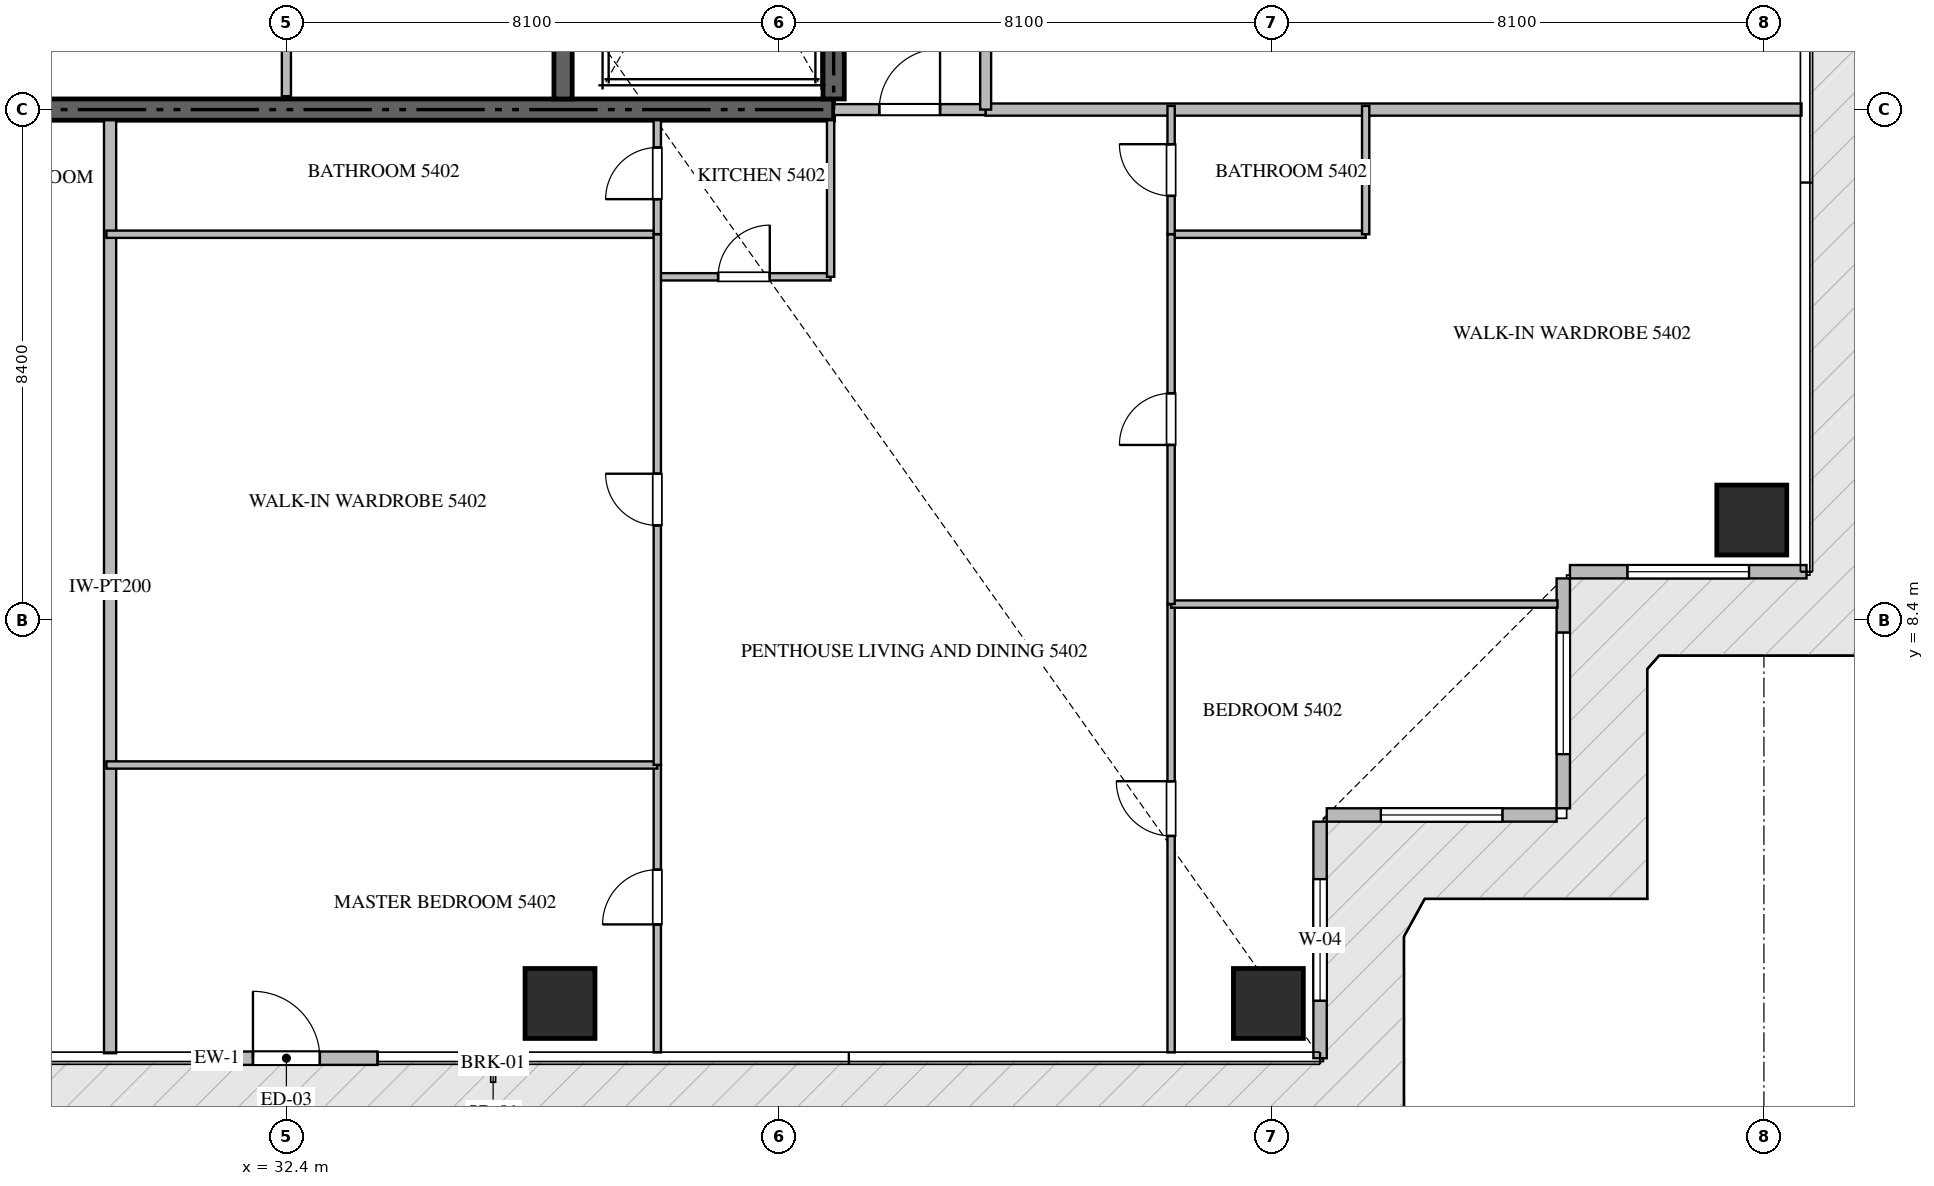
"""IFC4 building model, lengths in metres.
Left out: names, types, materials, properties, quantities, classifications, styles, units other than length and angle.
Written with IfcOpenShell. Run it as: python <this file> out.ifc"""

import sys

from ifc_helpers import new_model, si_unit, direction, frame, frame_2d, origin, origin_2d, place, context, subcontext, project, spatial, rectangle, extrude, source, transform, mapped, element, fill, save


model = new_model("IFC4")
c1 = context("Model", 3, precision=1e-05, world=origin(), true_north=direction((0.0, 1.0)))
c2 = subcontext(c1, "Body", "Model", "MODEL_VIEW")
j1 = project(units=[si_unit("LENGTHUNIT", "METRE"), si_unit("PLANEANGLEUNIT", "RADIAN")], contexts=[c1])
p1 = place(None, origin())
s1 = spatial("IfcSite", under=j1, at=p1, CompositionType="ELEMENT")
p2 = place(p1, origin())
s2 = spatial("IfcBuilding", under=s1, at=p2, CompositionType="ELEMENT")
p3 = place(p2, frame((0.0, 0.0, 218.15)))
s3 = spatial("IfcBuildingStorey", under=s2, at=p3, CompositionType="ELEMENT", Elevation=218.15)
p4 = place(p3, frame((23.4, 16.8, -0.26), z_axis=(0.0, 0.0, 1.0), x_axis=(1.0, 0.0, 0.0)))
e1 = element("IfcWall", 1, at=p4, inside=s3, PredefinedType="SHEAR", context=c2, shape_type="SweptSolid", body=[
    extrude(rectangle(XDim=18.0, YDim=0.35, at=frame_2d((9.0, 0.0))), origin(), (0.0, 0.0, 1.0), 3.848),
])
p5 = place(p3, frame((41.4, 16.975, -0.26), z_axis=(0.0, 0.0, 1.0), x_axis=(0.0, 1.0, 0.0)))
e2 = element("IfcWall", 2, at=p5, inside=s3, PredefinedType="SHEAR", context=c2, shape_type="SweptSolid", body=[
    extrude(rectangle(XDim=8.375, YDim=0.35, at=frame_2d((4.188, 0.0))), origin(), (0.0, 0.0, 1.0), 3.848),
])
p6 = place(p3, frame((36.95, 16.975, -0.26), z_axis=(0.0, 0.0, 1.0), x_axis=(0.0, 1.0, 0.0)))
e3 = element("IfcWall", 3, at=p6, inside=s3, PredefinedType="SHEAR", context=c2, shape_type="SweptSolid", body=[
    extrude(rectangle(XDim=8.375, YDim=0.3, at=frame_2d((4.188, 0.0))), origin(), (0.0, 0.0, 1.0), 3.848),
])
m1 = source(origin(), c2, "Body", "SweptSolid", [
    extrude(rectangle(XDim=1.15, YDim=1.15, at=origin_2d()), origin(), (0.0, 0.0, 1.0), 3.85),
])
for number, where, z_axis, x_axis in (
    (4, (36.9, 2.1, -0.26), (0.0, 0.0, 1.0), (1.0, 0.0, 0.0)),
    (5, (48.55, 2.1, -0.26), (0.0, 0.0, 1.0), (1.0, 0.0, 0.0)),
    (6, (56.5, 10.05, -0.26), (0.0, 0.0, 1.0), (1.0, 0.0, 0.0)),
):
    element("IfcColumn", number, at=place(p3, frame(where, z_axis=z_axis, x_axis=x_axis)), inside=s3, PredefinedType="COLUMN", context=c2, shape_type="MappedRepresentation", body=[
        mapped(m1, transform((0.0, 0.0, 0.0), scale=1.0)),
    ])
p7 = place(p3, frame((30.9, 1.2, 0.0), z_axis=(0.0, 0.0, 1.0), x_axis=(1.0, 0.0, 0.0)))
e7 = element("IfcWall", 7, at=p7, inside=s3, PredefinedType="ELEMENTEDWALL", context=c2, shape_type="SweptSolid", body=[
    extrude(rectangle(XDim=3.0, YDim=0.22, at=frame_2d((1.5, 0.0))), origin(), (0.0, 0.0, 1.0), 3.575),
])
p8 = place(p7, frame((0.95, 0.0, 0.0)))
e8 = element("IfcOpeningElement", 8, at=p8, cuts=e7, PredefinedType="OPENING", context=c2, shape_type="SweptSolid", body=[
    extrude(rectangle(XDim=1.1, YDim=2.2, at=frame_2d((0.55, 1.1))), frame((0.0, 0.12, 0.0), z_axis=(0.0, -1.0, 0.0), x_axis=(1.0, 0.0, 0.0)), (0.0, 0.0, 1.0), 0.24),
])
p9 = place(p3, frame((49.4, 1.2, 0.0), z_axis=(0.0, 0.0, 1.0), x_axis=(0.0, 1.0, 0.0)))
e9 = element("IfcWall", 9, at=p9, inside=s3, PredefinedType="ELEMENTEDWALL", context=c2, shape_type="SweptSolid", body=[
    extrude(rectangle(XDim=3.89, YDim=0.22, at=frame_2d((1.945, 0.0))), origin(), (0.0, 0.0, 1.0), 3.575),
])
p10 = place(p9, frame((0.945, 0.0, 0.65)))
e10 = element("IfcOpeningElement", 10, at=p10, cuts=e9, PredefinedType="OPENING", context=c2, shape_type="SweptSolid", body=[
    extrude(rectangle(XDim=2.0, YDim=2.2, at=frame_2d((1.0, 1.1))), frame((0.0, 0.12, 0.0), z_axis=(0.0, -1.0, 0.0), x_axis=(1.0, 0.0, 0.0)), (0.0, 0.0, 1.0), 0.24),
])
p11 = place(p3, frame((49.51, 5.2, 0.0), z_axis=(0.0, 0.0, 1.0), x_axis=(1.0, 0.0, 0.0)))
e11 = element("IfcWall", 11, at=p11, inside=s3, PredefinedType="ELEMENTEDWALL", context=c2, shape_type="SweptSolid", body=[
    extrude(rectangle(XDim=3.78, YDim=0.22, at=frame_2d((1.89, 0.0))), origin(), (0.0, 0.0, 1.0), 3.575),
])
p12 = place(p11, frame((0.89, 0.0, 0.65)))
e12 = element("IfcOpeningElement", 12, at=p12, cuts=e11, PredefinedType="OPENING", context=c2, shape_type="SweptSolid", body=[
    extrude(rectangle(XDim=2.0, YDim=2.2, at=frame_2d((1.0, 1.1))), frame((0.0, 0.12, 0.0), z_axis=(0.0, -1.0, 0.0), x_axis=(1.0, 0.0, 0.0)), (0.0, 0.0, 1.0), 0.24),
])
p13 = place(p3, frame((53.4, 5.31, 0.0), z_axis=(0.0, 0.0, 1.0), x_axis=(0.0, 1.0, 0.0)))
e13 = element("IfcWall", 13, at=p13, inside=s3, PredefinedType="ELEMENTEDWALL", context=c2, shape_type="SweptSolid", body=[
    extrude(rectangle(XDim=3.78, YDim=0.22, at=frame_2d((1.89, 0.0))), origin(), (0.0, 0.0, 1.0), 3.575),
])
p14 = place(p13, frame((0.89, 0.0, 0.65)))
e14 = element("IfcOpeningElement", 14, at=p14, cuts=e13, PredefinedType="OPENING", context=c2, shape_type="SweptSolid", body=[
    extrude(rectangle(XDim=2.0, YDim=2.2, at=frame_2d((1.0, 1.1))), frame((0.0, 0.12, 0.0), z_axis=(0.0, -1.0, 0.0), x_axis=(1.0, 0.0, 0.0)), (0.0, 0.0, 1.0), 0.24),
])
p15 = place(p3, frame((53.51, 9.2, 0.0), z_axis=(0.0, 0.0, 1.0), x_axis=(1.0, 0.0, 0.0)))
e15 = element("IfcWall", 15, at=p15, inside=s3, PredefinedType="ELEMENTEDWALL", context=c2, shape_type="SweptSolid", body=[
    extrude(rectangle(XDim=3.89, YDim=0.22, at=frame_2d((1.945, 0.0))), origin(), (0.0, 0.0, 1.0), 3.575),
])
p16 = place(p15, frame((0.945, 0.0, 0.65)))
e16 = element("IfcOpeningElement", 16, at=p16, cuts=e15, PredefinedType="OPENING", context=c2, shape_type="SweptSolid", body=[
    extrude(rectangle(XDim=2.0, YDim=2.2, at=frame_2d((1.0, 1.1))), frame((0.0, 0.12, 0.0), z_axis=(0.0, -1.0, 0.0), x_axis=(1.0, 0.0, 0.0)), (0.0, 0.0, 1.0), 0.24),
])
p17 = place(p3, frame((32.4, 17.02, 0.0), z_axis=(0.0, 0.0, 1.0), x_axis=(0.0, 1.0, 0.0)))
e17 = element("IfcWall", 17, at=p17, inside=s3, PredefinedType="PARTITIONING", context=c2, shape_type="SweptSolid", body=[
    extrude(rectangle(XDim=2.73, YDim=0.15, at=frame_2d((1.365, 0.0))), origin(), (0.0, 0.0, 1.0), 3.59),
])
p18 = place(p3, frame((29.5, 1.282, 0.0), z_axis=(0.0, 0.0, 1.0), x_axis=(0.0, 1.0, 0.0)))
e18 = element("IfcWall", 18, at=p18, inside=s3, PredefinedType="PARTITIONING", context=c2, shape_type="SweptSolid", body=[
    extrude(rectangle(XDim=15.343, YDim=0.2, at=frame_2d((7.671, 0.0))), origin(), (0.0, 0.0, 1.0), 3.59),
])
p19 = place(p3, frame((43.9, 16.8, 0.0), z_axis=(0.0, 0.0, 1.0), x_axis=(1.0, 0.0, 0.0)))
e19 = element("IfcWall", 19, at=p19, inside=s3, PredefinedType="PARTITIONING", context=c2, shape_type="SweptSolid", body=[
    extrude(rectangle(XDim=13.418, YDim=0.2, at=frame_2d((6.709, 0.0))), origin(), (0.0, 0.0, 1.0), 3.59),
])
p20 = place(p3, frame((41.402, 16.8, 0.0), z_axis=(0.0, 0.0, 1.0), x_axis=(1.0, 0.0, 0.0)))
e20 = element("IfcWall", 20, at=p20, inside=s3, PredefinedType="PARTITIONING", context=c2, shape_type="SweptSolid", body=[
    extrude(rectangle(XDim=2.496, YDim=0.18, at=frame_2d((1.248, 0.0))), origin(), (0.0, 0.0, 1.0), 3.59),
])
p21 = place(p20, frame((0.748, 0.0, 0.0)))
e21 = element("IfcOpeningElement", 21, at=p21, cuts=e20, PredefinedType="OPENING", context=c2, shape_type="SweptSolid", body=[
    extrude(rectangle(XDim=1.0, YDim=2.15, at=frame_2d((0.5, 1.075))), frame((0.0, 0.1, 0.0), z_axis=(0.0, -1.0, 0.0), x_axis=(1.0, 0.0, 0.0)), (0.0, 0.0, 1.0), 0.2),
])
p22 = place(p3, frame((43.9, 16.8, 0.0), z_axis=(0.0, 0.0, 1.0), x_axis=(0.0, 1.0, 0.0)))
e22 = element("IfcWall", 22, at=p22, inside=s3, PredefinedType="PARTITIONING", context=c2, shape_type="SweptSolid", body=[
    extrude(rectangle(XDim=16.8, YDim=0.18, at=frame_2d((8.4, 0.0))), origin(), (0.0, 0.0, 1.0), 3.59),
])
p23 = place(p22, frame((1.3, 0.0, 0.0)))
e23 = element("IfcOpeningElement", 23, at=p23, cuts=e22, PredefinedType="OPENING", context=c2, shape_type="SweptSolid", body=[
    extrude(rectangle(XDim=1.0, YDim=2.15, at=frame_2d((0.5, 1.075))), frame((0.0, 0.1, 0.0), z_axis=(0.0, -1.0, 0.0), x_axis=(1.0, 0.0, 0.0)), (0.0, 0.0, 1.0), 0.2),
])
p24 = place(p3, frame((38.5, 14.05, 0.0), z_axis=(0.0, 0.0, 1.0), x_axis=(1.0, 0.0, 0.0)))
e24 = element("IfcWall", 24, at=p24, inside=s3, PredefinedType="PARTITIONING", context=c2, shape_type="SweptSolid", body=[
    extrude(rectangle(XDim=2.85, YDim=0.12, at=frame_2d((1.425, 0.0))), origin(), (0.0, 0.0, 1.0), 3.59),
])
p25 = place(p24, frame((1.0, 0.0, 0.0)))
e25 = element("IfcOpeningElement", 25, at=p25, cuts=e24, PredefinedType="OPENING", context=c2, shape_type="SweptSolid", body=[
    extrude(rectangle(XDim=0.85, YDim=2.1, at=frame_2d((0.425, 1.05))), frame((0.0, 0.07, 0.0), z_axis=(0.0, -1.0, 0.0), x_axis=(1.0, 0.0, 0.0)), (0.0, 0.0, 1.0), 0.14),
])
p26 = place(p3, frame((41.35, 14.05, 0.0), z_axis=(0.0, 0.0, 1.0), x_axis=(0.0, 1.0, 0.0)))
e26 = element("IfcWall", 26, at=p26, inside=s3, PredefinedType="PARTITIONING", context=c2, shape_type="SweptSolid", body=[
    extrude(rectangle(XDim=2.575, YDim=0.12, at=frame_2d((1.288, 0.0))), origin(), (0.0, 0.0, 1.0), 3.59),
])
p27 = place(p3, frame((38.5, 1.295, 0.0), z_axis=(0.0, 0.0, 1.0), x_axis=(0.0, 1.0, 0.0)))
e27 = element("IfcWall", 27, at=p27, inside=s3, PredefinedType="PARTITIONING", context=c2, shape_type="SweptSolid", body=[
    extrude(rectangle(XDim=4.727, YDim=0.12, at=frame_2d((2.364, 0.0))), origin(), (0.0, 0.0, 1.0), 3.59),
])
p28 = place(p27, frame((2.105, 0.0, 0.0)))
e28 = element("IfcOpeningElement", 28, at=p28, cuts=e27, PredefinedType="OPENING", context=c2, shape_type="SweptSolid", body=[
    extrude(rectangle(XDim=0.9, YDim=2.1, at=frame_2d((0.45, 1.05))), frame((0.0, 0.07, 0.0), z_axis=(0.0, -1.0, 0.0), x_axis=(1.0, 0.0, 0.0)), (0.0, 0.0, 1.0), 0.14),
])
for number, where, z_axis, x_axis in (
    (29, (29.44, 6.022, 0.0), (0.0, 0.0, 1.0), (1.0, 0.0, 0.0)),
    (30, (29.44, 14.75, 0.0), (0.0, 0.0, 1.0), (1.0, 0.0, 0.0)),
):
    element("IfcWall", number, at=place(p3, frame(where, z_axis=z_axis, x_axis=x_axis)), inside=s3, PredefinedType="PARTITIONING", context=c2, shape_type="SweptSolid", body=[
        extrude(rectangle(XDim=9.06, YDim=0.12, at=frame_2d((4.53, 0.0))), origin(), (0.0, 0.0, 1.0), 3.59),
    ])
p29 = place(p3, frame((38.5, 6.024, 0.0), z_axis=(0.0, 0.0, 1.0), x_axis=(0.0, 1.0, 0.0)))
e31 = element("IfcWall", 31, at=p29, inside=s3, PredefinedType="PARTITIONING", context=c2, shape_type="SweptSolid", body=[
    extrude(rectangle(XDim=8.726, YDim=0.12, at=frame_2d((4.363, 0.0))), origin(), (0.0, 0.0, 1.0), 3.59),
])
p30 = place(p29, frame((3.938, 0.0, 0.0)))
e32 = element("IfcOpeningElement", 32, at=p30, cuts=e31, PredefinedType="OPENING", context=c2, shape_type="SweptSolid", body=[
    extrude(rectangle(XDim=0.85, YDim=2.1, at=frame_2d((0.425, 1.05))), frame((0.0, 0.07, 0.0), z_axis=(0.0, -1.0, 0.0), x_axis=(1.0, 0.0, 0.0)), (0.0, 0.0, 1.0), 0.14),
])
p31 = place(p3, frame((38.5, 14.752, 0.0), z_axis=(0.0, 0.0, 1.0), x_axis=(0.0, 1.0, 0.0)))
e33 = element("IfcWall", 33, at=p31, inside=s3, PredefinedType="PARTITIONING", context=c2, shape_type="SweptSolid", body=[
    extrude(rectangle(XDim=1.873, YDim=0.12, at=frame_2d((0.937, 0.0))), origin(), (0.0, 0.0, 1.0), 3.59),
])
p32 = place(p31, frame((0.575, 0.0, 0.0)))
e34 = element("IfcOpeningElement", 34, at=p32, cuts=e33, PredefinedType="OPENING", context=c2, shape_type="SweptSolid", body=[
    extrude(rectangle(XDim=0.85, YDim=2.1, at=frame_2d((0.425, 1.05))), frame((0.0, 0.07, 0.0), z_axis=(0.0, -1.0, 0.0), x_axis=(1.0, 0.0, 0.0)), (0.0, 0.0, 1.0), 0.14),
])
p33 = place(p3, frame((46.95, 1.295, 0.0), z_axis=(0.0, 0.0, 1.0), x_axis=(0.0, 1.0, 0.0)))
e35 = element("IfcWall", 35, at=p33, inside=s3, PredefinedType="PARTITIONING", context=c2, shape_type="SweptSolid", body=[
    extrude(rectangle(XDim=7.373, YDim=0.12, at=frame_2d((3.687, 0.0))), origin(), (0.0, 0.0, 1.0), 3.59),
])
p34 = place(p33, frame((3.56, 0.0, 0.0)))
e36 = element("IfcOpeningElement", 36, at=p34, cuts=e35, PredefinedType="OPENING", context=c2, shape_type="SweptSolid", body=[
    extrude(rectangle(XDim=0.9, YDim=2.1, at=frame_2d((0.45, 1.05))), frame((0.0, 0.07, 0.0), z_axis=(0.0, -1.0, 0.0), x_axis=(1.0, 0.0, 0.0)), (0.0, 0.0, 1.0), 0.14),
])
p35 = place(p3, frame((46.95, 8.668, 0.0), z_axis=(0.0, 0.0, 1.0), x_axis=(1.0, 0.0, 0.0)))
e37 = element("IfcWall", 37, at=p35, inside=s3, PredefinedType="PARTITIONING", context=c2, shape_type="SweptSolid", body=[
    extrude(rectangle(XDim=6.355, YDim=0.12, at=frame_2d((3.177, 0.0))), origin(), (0.0, 0.0, 1.0), 3.59),
])
p36 = place(p3, frame((46.95, 14.75, 0.0), z_axis=(0.0, 0.0, 1.0), x_axis=(1.0, 0.0, 0.0)))
e38 = element("IfcWall", 38, at=p36, inside=s3, PredefinedType="PARTITIONING", context=c2, shape_type="SweptSolid", body=[
    extrude(rectangle(XDim=3.2, YDim=0.12, at=frame_2d((1.6, 0.0))), origin(), (0.0, 0.0, 1.0), 3.59),
])
p37 = place(p3, frame((50.15, 14.75, 0.0), z_axis=(0.0, 0.0, 1.0), x_axis=(0.0, 1.0, 0.0)))
e39 = element("IfcWall", 39, at=p37, inside=s3, PredefinedType="PARTITIONING", context=c2, shape_type="SweptSolid", body=[
    extrude(rectangle(XDim=2.11, YDim=0.12, at=frame_2d((1.055, 0.0))), origin(), (0.0, 0.0, 1.0), 3.59),
])
p38 = place(p3, frame((46.95, 8.67, 0.0), z_axis=(0.0, 0.0, 1.0), x_axis=(0.0, 1.0, 0.0)))
e40 = element("IfcWall", 40, at=p38, inside=s3, PredefinedType="PARTITIONING", context=c2, shape_type="SweptSolid", body=[
    extrude(rectangle(XDim=6.08, YDim=0.12, at=frame_2d((3.04, 0.0))), origin(), (0.0, 0.0, 1.0), 3.59),
])
p39 = place(p38, frame((2.615, 0.0, 0.0)))
e41 = element("IfcOpeningElement", 41, at=p39, cuts=e40, PredefinedType="OPENING", context=c2, shape_type="SweptSolid", body=[
    extrude(rectangle(XDim=0.85, YDim=2.1, at=frame_2d((0.425, 1.05))), frame((0.0, 0.07, 0.0), z_axis=(0.0, -1.0, 0.0), x_axis=(1.0, 0.0, 0.0)), (0.0, 0.0, 1.0), 0.14),
])
p40 = place(p3, frame((46.95, 14.752, 0.0), z_axis=(0.0, 0.0, 1.0), x_axis=(0.0, 1.0, 0.0)))
e42 = element("IfcWall", 42, at=p40, inside=s3, PredefinedType="PARTITIONING", context=c2, shape_type="SweptSolid", body=[
    extrude(rectangle(XDim=2.108, YDim=0.12, at=frame_2d((1.054, 0.0))), origin(), (0.0, 0.0, 1.0), 3.59),
])
p41 = place(p40, frame((0.629, 0.0, 0.0)))
e43 = element("IfcOpeningElement", 43, at=p41, cuts=e42, PredefinedType="OPENING", context=c2, shape_type="SweptSolid", body=[
    extrude(rectangle(XDim=0.85, YDim=2.1, at=frame_2d((0.425, 1.05))), frame((0.0, 0.07, 0.0), z_axis=(0.0, -1.0, 0.0), x_axis=(1.0, 0.0, 0.0)), (0.0, 0.0, 1.0), 0.14),
])
m2 = source(origin(), c2, "Body", "SweptSolid", [
    extrude(rectangle(XDim=1.1, YDim=2.2, at=frame_2d((0.55, 1.1))), frame((0.0, 0.025, 0.0), z_axis=(0.0, -1.0, 0.0), x_axis=(1.0, 0.0, 0.0)), (0.0, 0.0, 1.0), 0.05),
])
p42 = place(p8, origin())
e44 = element("IfcDoor", 44, at=p42, inside=s3, OperationType="SINGLE_SWING_LEFT", PredefinedType="DOOR", context=c2, shape_type="MappedRepresentation", body=[
    mapped(m2, transform((0.0, 0.0, 0.0), scale=1.0)),
])
fill(e8, e44)
m3 = source(origin(), c2, "Body", "SweptSolid", [
    extrude(rectangle(XDim=2.0, YDim=2.2, at=frame_2d((1.0, 1.1))), frame((0.0, 0.03, 0.0), z_axis=(0.0, -1.0, 0.0), x_axis=(1.0, 0.0, 0.0)), (0.0, 0.0, 1.0), 0.06),
])
p43 = place(p10, origin())
e45 = element("IfcWindow", 45, at=p43, inside=s3, PartitioningType="SINGLE_PANEL", PredefinedType="WINDOW", context=c2, shape_type="MappedRepresentation", body=[
    mapped(m3, transform((0.0, 0.0, 0.0), scale=1.0)),
])
fill(e10, e45)
p44 = place(p12, origin())
e46 = element("IfcWindow", 46, at=p44, inside=s3, PartitioningType="SINGLE_PANEL", PredefinedType="WINDOW", context=c2, shape_type="MappedRepresentation", body=[
    mapped(m3, transform((0.0, 0.0, 0.0), scale=1.0)),
])
fill(e12, e46)
p45 = place(p14, origin())
e47 = element("IfcWindow", 47, at=p45, inside=s3, PartitioningType="SINGLE_PANEL", PredefinedType="WINDOW", context=c2, shape_type="MappedRepresentation", body=[
    mapped(m3, transform((0.0, 0.0, 0.0), scale=1.0)),
])
fill(e14, e47)
p46 = place(p16, origin())
e48 = element("IfcWindow", 48, at=p46, inside=s3, PartitioningType="SINGLE_PANEL", PredefinedType="WINDOW", context=c2, shape_type="MappedRepresentation", body=[
    mapped(m3, transform((0.0, 0.0, 0.0), scale=1.0)),
])
fill(e16, e48)
m4 = source(origin(), c2, "Body", "SweptSolid", [
    extrude(rectangle(XDim=1.0, YDim=2.15, at=frame_2d((0.5, 1.075))), frame((0.0, 0.025, 0.0), z_axis=(0.0, -1.0, 0.0), x_axis=(1.0, 0.0, 0.0)), (0.0, 0.0, 1.0), 0.05),
])
p47 = place(p21, origin())
e49 = element("IfcDoor", 49, at=p47, inside=s3, OperationType="SINGLE_SWING_RIGHT", PredefinedType="DOOR", context=c2, shape_type="MappedRepresentation", body=[
    mapped(m4, transform((0.0, 0.0, 0.0), scale=1.0)),
])
fill(e21, e49)
m5 = source(origin(), c2, "Body", "SweptSolid", [
    extrude(rectangle(XDim=0.85, YDim=2.1, at=frame_2d((0.425, 1.05))), frame((0.0, 0.025, 0.0), z_axis=(0.0, -1.0, 0.0), x_axis=(1.0, 0.0, 0.0)), (0.0, 0.0, 1.0), 0.05),
])
p48 = place(p25, origin())
e50 = element("IfcDoor", 50, at=p48, inside=s3, OperationType="SINGLE_SWING_RIGHT", PredefinedType="DOOR", context=c2, shape_type="MappedRepresentation", body=[
    mapped(m5, transform((0.0, 0.0, 0.0), scale=1.0)),
])
fill(e25, e50)
m6 = source(origin(), c2, "Body", "SweptSolid", [
    extrude(rectangle(XDim=0.9, YDim=2.1, at=frame_2d((0.45, 1.05))), frame((0.0, 0.025, 0.0), z_axis=(0.0, -1.0, 0.0), x_axis=(1.0, 0.0, 0.0)), (0.0, 0.0, 1.0), 0.05),
])
p49 = place(p28, origin())
e51 = element("IfcDoor", 51, at=p49, inside=s3, OperationType="SINGLE_SWING_LEFT", PredefinedType="DOOR", context=c2, shape_type="MappedRepresentation", body=[
    mapped(m6, transform((0.0, 0.0, 0.0), scale=1.0)),
])
fill(e28, e51)
p50 = place(p30, origin())
e52 = element("IfcDoor", 52, at=p50, inside=s3, OperationType="SINGLE_SWING_RIGHT", PredefinedType="DOOR", context=c2, shape_type="MappedRepresentation", body=[
    mapped(m5, transform((0.0, 0.0, 0.0), scale=1.0)),
])
fill(e32, e52)
p51 = place(p32, origin())
e53 = element("IfcDoor", 53, at=p51, inside=s3, OperationType="SINGLE_SWING_LEFT", PredefinedType="DOOR", context=c2, shape_type="MappedRepresentation", body=[
    mapped(m5, transform((0.0, 0.0, 0.0), scale=1.0)),
])
fill(e34, e53)
p52 = place(p34, origin())
e54 = element("IfcDoor", 54, at=p52, inside=s3, OperationType="SINGLE_SWING_RIGHT", PredefinedType="DOOR", context=c2, shape_type="MappedRepresentation", body=[
    mapped(m6, transform((0.0, 0.0, 0.0), scale=1.0)),
])
fill(e36, e54)
p53 = place(p39, origin())
e55 = element("IfcDoor", 55, at=p53, inside=s3, OperationType="SINGLE_SWING_LEFT", PredefinedType="DOOR", context=c2, shape_type="MappedRepresentation", body=[
    mapped(m5, transform((0.0, 0.0, 0.0), scale=1.0)),
])
fill(e41, e55)
p54 = place(p41, origin())
e56 = element("IfcDoor", 56, at=p54, inside=s3, OperationType="SINGLE_SWING_RIGHT", PredefinedType="DOOR", context=c2, shape_type="MappedRepresentation", body=[
    mapped(m5, transform((0.0, 0.0, 0.0), scale=1.0)),
])
fill(e43, e56)
save(model, sys.argv[1])
